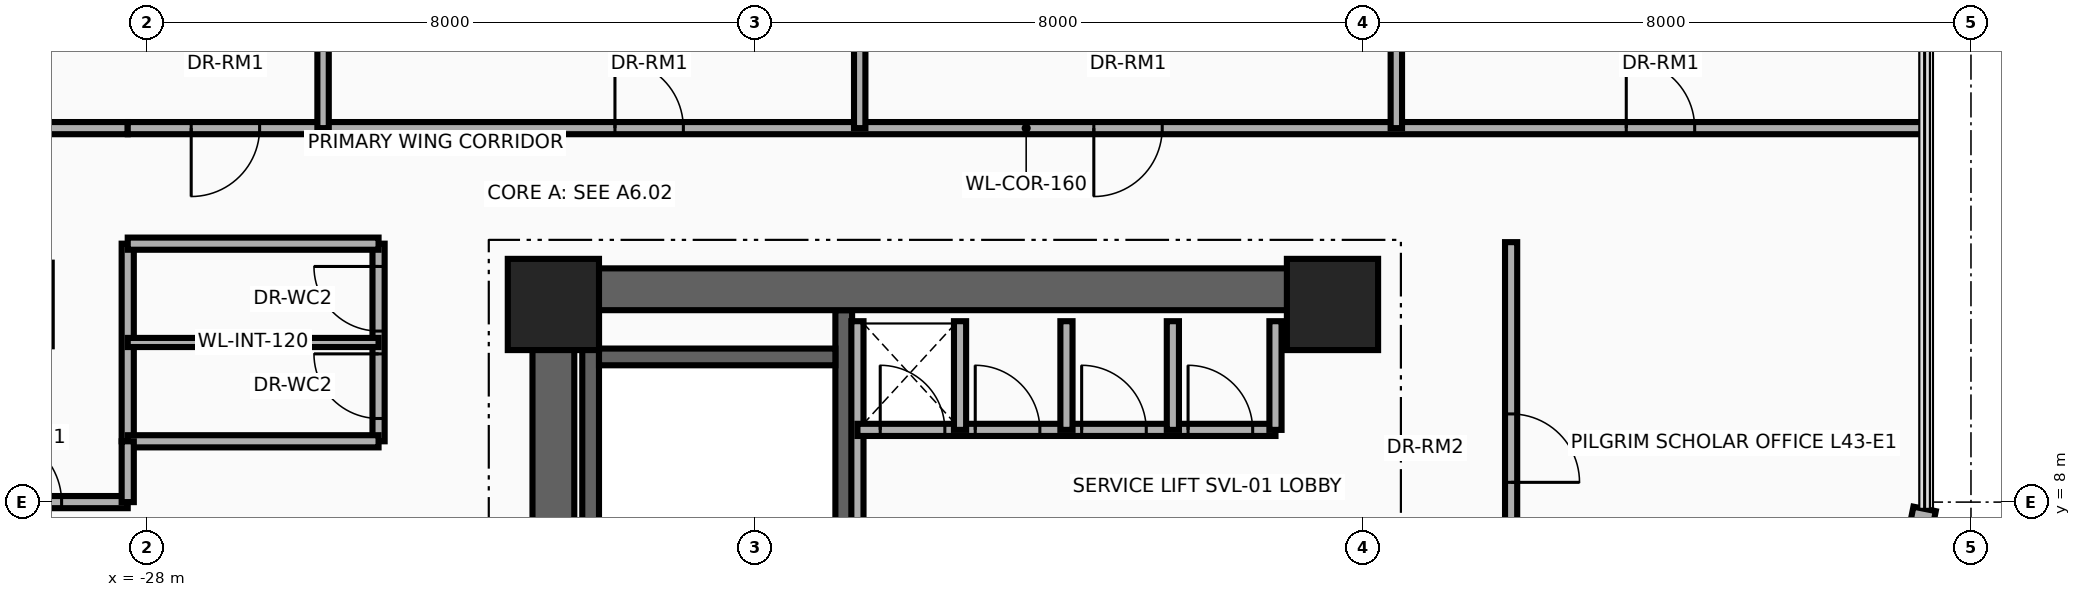
"""IFC4 building model, lengths in metres.
Left out: names, types, materials, properties, quantities, classifications, styles, units other than length and angle.
Written with IfcOpenShell. Run it as: python <this file> out.ifc"""

import sys

from ifc_helpers import new_model, si_unit, direction, frame, frame_2d, origin, origin_2d, place, context, subcontext, project, spatial, rectangle, extrude, source, transform, mapped, element, fill, save


model = new_model("IFC4")
c1 = context("Model", 3, precision=1e-05, world=origin(), true_north=direction((0.0, 1.0)))
c2 = subcontext(c1, "Body", "Model", "MODEL_VIEW")
j1 = project(units=[si_unit("LENGTHUNIT", "METRE"), si_unit("PLANEANGLEUNIT", "RADIAN")], contexts=[c1])
p1 = place(None, origin())
s1 = spatial("IfcSite", under=j1, at=p1, CompositionType="ELEMENT")
p2 = place(p1, origin())
s2 = spatial("IfcBuilding", under=s1, at=p2, CompositionType="ELEMENT")
p3 = place(p2, frame((0.0, 0.0, 168.6)))
s3 = spatial("IfcBuildingStorey", under=s2, at=p3, CompositionType="ELEMENT", Elevation=168.6)
for number, where, z_axis, x_axis in (
    (1, (-22.16, 1.78, 0.0), (0.0, 0.0, 1.0), (0.0, 1.0, 0.0)),
    (2, (-18.83, 1.78, 0.0), (0.0, 0.0, 1.0), (0.0, 1.0, 0.0)),
):
    element("IfcWall", number, at=place(p3, frame(where, z_axis=z_axis, x_axis=x_axis)), inside=s3, PredefinedType="SHEAR", context=c2, shape_type="SweptSolid", body=[
        extrude(rectangle(XDim=8.745, YDim=0.22, at=frame_2d((4.373, 0.0))), origin(), (0.0, 0.0, 1.0), 3.3),
    ])
p4 = place(p3, frame((-22.05, 9.91, 0.0), z_axis=(0.0, 0.0, 1.0), x_axis=(1.0, 0.0, 0.0)))
e3 = element("IfcWall", 3, at=p4, inside=s3, PredefinedType="SHEAR", context=c2, shape_type="SweptSolid", body=[
    extrude(rectangle(XDim=3.11, YDim=0.22, at=frame_2d((1.555, 0.0))), origin(), (0.0, 0.0, 1.0), 3.3),
])
p5 = place(p3, frame((-22.65, -11.075, 0.0), z_axis=(0.0, 0.0, 1.0), x_axis=(0.0, 1.0, 0.0)))
e4 = element("IfcWall", 4, at=p5, inside=s3, PredefinedType="SHEAR", context=c2, shape_type="SweptSolid", body=[
    extrude(rectangle(XDim=22.15, YDim=0.55, at=frame_2d((11.075, 0.0))), origin(), (0.0, 0.0, 1.0), 3.3),
])
p6 = place(p3, frame((-22.65, 10.8, 0.0), z_axis=(0.0, 0.0, 1.0), x_axis=(1.0, 0.0, 0.0)))
e5 = element("IfcWall", 5, at=p6, inside=s3, PredefinedType="SHEAR", context=c2, shape_type="SweptSolid", body=[
    extrude(rectangle(XDim=10.25, YDim=0.55, at=frame_2d((5.125, 0.0))), origin(), (0.0, 0.0, 1.0), 3.3),
])
m1 = source(origin(), c2, "Body", "SweptSolid", [
    extrude(rectangle(XDim=1.2, YDim=1.2, at=origin_2d()), origin(), (0.0, 0.0, 1.0), 3.7),
])
for number, where, z_axis, x_axis in (
    (6, (-22.65, 10.6, 0.0), (0.0, 0.0, 1.0), (1.0, 0.0, 0.0)),
    (7, (-12.4, 10.6, 0.0), (0.0, 0.0, 1.0), (1.0, 0.0, 0.0)),
):
    element("IfcColumn", number, at=place(p3, frame(where, z_axis=z_axis, x_axis=x_axis)), inside=s3, PredefinedType="COLUMN", context=c2, shape_type="MappedRepresentation", body=[
        mapped(m1, transform((0.0, 0.0, 0.0), x_axis=(1.0, 0.0, 0.0), y_axis=(0.0, 1.0, 0.0), z_axis=(0.0, 0.0, 1.0), scale=1.0)),
    ])
p7 = place(p3, frame((-4.61, 7.911, 0.0), z_axis=(0.0, 0.0, 1.0), x_axis=(-0.194989739953, -0.980805282058, 0.0)))
e8 = element("IfcWall", 8, at=p7, inside=s3, PredefinedType="SOLIDWALL", context=c2, shape_type="SweptSolid", body=[
    extrude(rectangle(XDim=0.709, YDim=0.3, at=frame_2d((0.354, 0.0))), origin(), (0.0, 0.0, 1.0), 3.3),
])
p8 = place(p3, frame((-18.65, 7.45, 0.0), z_axis=(0.0, 0.0, 1.0), x_axis=(0.0, 1.0, 0.0)))
e9 = element("IfcWall", 9, at=p8, inside=s3, PredefinedType="PARTITIONING", context=c2, shape_type="SweptSolid", body=[
    extrude(rectangle(XDim=2.93, YDim=0.16, at=frame_2d((1.465, 0.0))), origin(), (0.0, 0.0, 1.0), 2.085),
])
p9 = place(p3, frame((-18.65, 8.95, 0.0), z_axis=(0.0, 0.0, 1.0), x_axis=(1.0, 0.0, 0.0)))
e10 = element("IfcWall", 10, at=p9, inside=s3, PredefinedType="PARTITIONING", context=c2, shape_type="SweptSolid", body=[
    extrude(rectangle(XDim=5.5, YDim=0.16, at=frame_2d((2.75, 0.0))), origin(), (0.0, 0.0, 1.0), 3.3),
])
p10 = place(p9, frame((0.3, 0.0, 0.0)))
e11 = element("IfcOpeningElement", 11, at=p10, cuts=e10, PredefinedType="OPENING", context=c2, shape_type="SweptSolid", body=[
    extrude(rectangle(XDim=0.85, YDim=2.05, at=frame_2d((0.425, 1.025))), frame((0.0, 0.095, 0.0), z_axis=(0.0, -1.0, 0.0), x_axis=(1.0, 0.0, 0.0)), (0.0, 0.0, 1.0), 0.19),
])
p11 = place(p9, frame((1.55, 0.0, 0.0)))
e12 = element("IfcOpeningElement", 12, at=p11, cuts=e10, PredefinedType="OPENING", context=c2, shape_type="SweptSolid", body=[
    extrude(rectangle(XDim=0.85, YDim=2.05, at=frame_2d((0.425, 1.025))), frame((0.0, 0.095, 0.0), z_axis=(0.0, -1.0, 0.0), x_axis=(1.0, 0.0, 0.0)), (0.0, 0.0, 1.0), 0.19),
])
p12 = place(p9, frame((2.95, 0.0, 0.0)))
e13 = element("IfcOpeningElement", 13, at=p12, cuts=e10, PredefinedType="OPENING", context=c2, shape_type="SweptSolid", body=[
    extrude(rectangle(XDim=0.85, YDim=2.05, at=frame_2d((0.425, 1.025))), frame((0.0, 0.095, 0.0), z_axis=(0.0, -1.0, 0.0), x_axis=(1.0, 0.0, 0.0)), (0.0, 0.0, 1.0), 0.19),
])
p13 = place(p9, frame((4.35, 0.0, 0.0)))
e14 = element("IfcOpeningElement", 14, at=p13, cuts=e10, PredefinedType="OPENING", context=c2, shape_type="SweptSolid", body=[
    extrude(rectangle(XDim=0.85, YDim=2.05, at=frame_2d((0.425, 1.025))), frame((0.0, 0.095, 0.0), z_axis=(0.0, -1.0, 0.0), x_axis=(1.0, 0.0, 0.0)), (0.0, 0.0, 1.0), 0.19),
])
for number, where, z_axis, x_axis in (
    (15, (-13.15, 8.95, 0.0), (0.0, 0.0, 1.0), (0.0, 1.0, 0.0)),
    (16, (-17.3, 8.95, 0.0), (0.0, 0.0, 1.0), (0.0, 1.0, 0.0)),
    (17, (-15.9, 8.95, 0.0), (0.0, 0.0, 1.0), (0.0, 1.0, 0.0)),
    (18, (-14.5, 8.95, 0.0), (0.0, 0.0, 1.0), (0.0, 1.0, 0.0)),
):
    element("IfcWall", number, at=place(p3, frame(where, z_axis=z_axis, x_axis=x_axis)), inside=s3, PredefinedType="PARTITIONING", context=c2, shape_type="SweptSolid", body=[
        extrude(rectangle(XDim=1.43, YDim=0.16, at=frame_2d((0.715, 0.0))), origin(), (0.0, 0.0, 1.0), 2.085),
    ])
p14 = place(p3, frame((-28.25, 8.8, 0.0), z_axis=(0.0, 0.0, 1.0), x_axis=(0.0, 1.0, 0.0)))
e19 = element("IfcWall", 19, at=p14, inside=s3, PredefinedType="PARTITIONING", context=c2, shape_type="SweptSolid", body=[
    extrude(rectangle(XDim=2.6, YDim=0.16, at=frame_2d((1.3, 0.0))), origin(), (0.0, 0.0, 1.0), 2.085),
])
p15 = place(p3, frame((-24.95, 8.8, 0.0), z_axis=(0.0, 0.0, 1.0), x_axis=(0.0, 1.0, 0.0)))
e20 = element("IfcWall", 20, at=p15, inside=s3, PredefinedType="PARTITIONING", context=c2, shape_type="SweptSolid", body=[
    extrude(rectangle(XDim=2.6, YDim=0.16, at=frame_2d((1.3, 0.0))), origin(), (0.0, 0.0, 1.0), 2.085),
])
p16 = place(p15, frame((0.3, 0.0, 0.0)))
e21 = element("IfcOpeningElement", 21, at=p16, cuts=e20, PredefinedType="OPENING", context=c2, shape_type="SweptSolid", body=[
    extrude(rectangle(XDim=0.85, YDim=2.04, at=frame_2d((0.425, 1.02))), frame((0.0, 0.095, 0.0), z_axis=(0.0, -1.0, 0.0), x_axis=(1.0, 0.0, 0.0)), (0.0, 0.0, 1.0), 0.19),
])
p17 = place(p15, frame((1.45, 0.0, 0.0)))
e22 = element("IfcOpeningElement", 22, at=p17, cuts=e20, PredefinedType="OPENING", context=c2, shape_type="SweptSolid", body=[
    extrude(rectangle(XDim=0.85, YDim=2.04, at=frame_2d((0.425, 1.02))), frame((0.0, 0.095, 0.0), z_axis=(0.0, -1.0, 0.0), x_axis=(1.0, 0.0, 0.0)), (0.0, 0.0, 1.0), 0.19),
])
for number, where, z_axis, x_axis in (
    (23, (-28.25, 8.8, 0.0), (0.0, 0.0, 1.0), (1.0, 0.0, 0.0)),
    (24, (-28.25, 11.4, 0.0), (0.0, 0.0, 1.0), (1.0, 0.0, 0.0)),
):
    element("IfcWall", number, at=place(p3, frame(where, z_axis=z_axis, x_axis=x_axis)), inside=s3, PredefinedType="PARTITIONING", context=c2, shape_type="SweptSolid", body=[
        extrude(rectangle(XDim=3.3, YDim=0.16, at=frame_2d((1.65, 0.0))), origin(), (0.0, 0.0, 1.0), 3.3),
    ])
p18 = place(p3, frame((-28.25, 10.1, 0.0), z_axis=(0.0, 0.0, 1.0), x_axis=(1.0, 0.0, 0.0)))
e25 = element("IfcWall", 25, at=p18, inside=s3, PredefinedType="PARTITIONING", context=c2, shape_type="SweptSolid", body=[
    extrude(rectangle(XDim=3.3, YDim=0.12, at=frame_2d((1.65, 0.0))), origin(), (0.0, 0.0, 1.0), 2.085),
])
p19 = place(p3, frame((-30.89, 8.0, 0.0), z_axis=(0.0, 0.0, 1.0), x_axis=(1.0, 0.0, 0.0)))
e26 = element("IfcWall", 26, at=p19, inside=s3, PredefinedType="PARTITIONING", context=c2, shape_type="SweptSolid", body=[
    extrude(rectangle(XDim=2.64, YDim=0.16, at=frame_2d((1.32, 0.0))), origin(), (0.0, 0.0, 1.0), 2.746),
])
p20 = place(p19, frame((0.87, 0.0, 0.0)))
e27 = element("IfcOpeningElement", 27, at=p20, cuts=e26, PredefinedType="OPENING", context=c2, shape_type="SweptSolid", body=[
    extrude(rectangle(XDim=0.9, YDim=2.1, at=frame_2d((0.45, 1.05))), frame((0.0, 0.095, 0.0), z_axis=(0.0, -1.0, 0.0), x_axis=(1.0, 0.0, 0.0)), (0.0, 0.0, 1.0), 0.19),
])
p21 = place(p3, frame((-28.25, 8.0, 0.0), z_axis=(0.0, 0.0, 1.0), x_axis=(0.0, 1.0, 0.0)))
e28 = element("IfcWall", 28, at=p21, inside=s3, PredefinedType="PARTITIONING", context=c2, shape_type="SweptSolid", body=[
    extrude(rectangle(XDim=0.8, YDim=0.16, at=frame_2d((0.4, 0.0))), origin(), (0.0, 0.0, 1.0), 2.828),
])
p22 = place(p3, frame((-30.89, 12.92, 0.0), z_axis=(0.0, 0.0, 1.0), x_axis=(1.0, 0.0, 0.0)))
e29 = element("IfcWall", 29, at=p22, inside=s3, PredefinedType="PARTITIONING", context=c2, shape_type="SweptSolid", body=[
    extrude(rectangle(XDim=2.64, YDim=0.16, at=frame_2d((1.32, 0.0))), origin(), (0.0, 0.0, 1.0), 2.746),
])
p23 = place(p3, frame((-28.25, 12.92, 0.0), z_axis=(0.0, 0.0, 1.0), x_axis=(1.0, 0.0, 0.0)))
e30 = element("IfcWall", 30, at=p23, inside=s3, PredefinedType="PARTITIONING", context=c2, shape_type="SweptSolid", body=[
    extrude(rectangle(XDim=23.64, YDim=0.16, at=frame_2d((11.82, 0.0))), origin(), (0.0, 0.0, 1.0), 2.674),
])
p24 = place(p23, frame((0.835, 0.0, 0.0)))
e31 = element("IfcOpeningElement", 31, at=p24, cuts=e30, PredefinedType="OPENING", context=c2, shape_type="SweptSolid", body=[
    extrude(rectangle(XDim=0.9, YDim=2.1, at=frame_2d((0.45, 1.05))), frame((0.0, 0.095, 0.0), z_axis=(0.0, -1.0, 0.0), x_axis=(1.0, 0.0, 0.0)), (0.0, 0.0, 1.0), 0.19),
])
p25 = place(p23, frame((6.41, 0.0, 0.0)))
e32 = element("IfcOpeningElement", 32, at=p25, cuts=e30, PredefinedType="OPENING", context=c2, shape_type="SweptSolid", body=[
    extrude(rectangle(XDim=0.9, YDim=2.1, at=frame_2d((0.45, 1.05))), frame((0.0, 0.095, 0.0), z_axis=(0.0, -1.0, 0.0), x_axis=(1.0, 0.0, 0.0)), (0.0, 0.0, 1.0), 0.19),
])
p26 = place(p23, frame((12.71, 0.0, 0.0)))
e33 = element("IfcOpeningElement", 33, at=p26, cuts=e30, PredefinedType="OPENING", context=c2, shape_type="SweptSolid", body=[
    extrude(rectangle(XDim=0.9, YDim=2.1, at=frame_2d((0.45, 1.05))), frame((0.0, 0.095, 0.0), z_axis=(0.0, -1.0, 0.0), x_axis=(1.0, 0.0, 0.0)), (0.0, 0.0, 1.0), 0.19),
])
p27 = place(p23, frame((19.715, 0.0, 0.0)))
e34 = element("IfcOpeningElement", 34, at=p27, cuts=e30, PredefinedType="OPENING", context=c2, shape_type="SweptSolid", body=[
    extrude(rectangle(XDim=0.9, YDim=2.1, at=frame_2d((0.45, 1.05))), frame((0.0, 0.095, 0.0), z_axis=(0.0, -1.0, 0.0), x_axis=(1.0, 0.0, 0.0)), (0.0, 0.0, 1.0), 0.19),
])
p28 = place(p3, frame((-25.68, 12.92, 0.0), z_axis=(0.0, 0.0, 1.0), x_axis=(0.0, 1.0, 0.0)))
e35 = element("IfcWall", 35, at=p28, inside=s3, PredefinedType="PARTITIONING", context=c2, shape_type="SweptSolid", body=[
    extrude(rectangle(XDim=6.051, YDim=0.15, at=frame_2d((3.025, 0.0))), origin(), (0.0, 0.0, 1.0), 2.085),
])
p29 = place(p3, frame((-18.62, 12.92, 0.0), z_axis=(0.0, 0.0, 1.0), x_axis=(0.0, 1.0, 0.0)))
e36 = element("IfcWall", 36, at=p29, inside=s3, PredefinedType="PARTITIONING", context=c2, shape_type="SweptSolid", body=[
    extrude(rectangle(XDim=6.424, YDim=0.15, at=frame_2d((3.212, 0.0))), origin(), (0.0, 0.0, 1.0), 2.085),
])
p30 = place(p3, frame((-11.56, 12.92, 0.0), z_axis=(0.0, 0.0, 1.0), x_axis=(0.0, 1.0, 0.0)))
e37 = element("IfcWall", 37, at=p30, inside=s3, PredefinedType="PARTITIONING", context=c2, shape_type="SweptSolid", body=[
    extrude(rectangle(XDim=6.797, YDim=0.15, at=frame_2d((3.398, 0.0))), origin(), (0.0, 0.0, 1.0), 1.785),
])
p31 = place(p3, frame((-10.05, 6.0, 0.0), z_axis=(0.0, 0.0, 1.0), x_axis=(0.0, 1.0, 0.0)))
e38 = element("IfcWall", 38, at=p31, inside=s3, PredefinedType="PARTITIONING", context=c2, shape_type="SweptSolid", body=[
    extrude(rectangle(XDim=5.42, YDim=0.16, at=frame_2d((2.71, 0.0))), origin(), (0.0, 0.0, 1.0), 1.785),
])
p32 = place(p31, frame((2.26, 0.0, 0.0)))
e39 = element("IfcOpeningElement", 39, at=p32, cuts=e38, PredefinedType="OPENING", context=c2, shape_type="SweptSolid", body=[
    extrude(rectangle(XDim=0.9, YDim=2.04, at=frame_2d((0.45, 1.02))), frame((0.0, 0.095, 0.0), z_axis=(0.0, -1.0, 0.0), x_axis=(1.0, 0.0, 0.0)), (0.0, 0.0, 1.0), 0.19),
])
p33 = place(p10, origin())
e40 = element("IfcDoor", 40, at=p33, inside=s3, OperationType="SINGLE_SWING_LEFT", PredefinedType="DOOR", context=c2, shape_type="SweptSolid", body=[
    extrude(rectangle(XDim=0.85, YDim=2.05, at=frame_2d((0.425, 1.025))), frame((0.0, 0.025, 0.0), z_axis=(0.0, -1.0, 0.0), x_axis=(1.0, 0.0, 0.0)), (0.0, 0.0, 1.0), 0.05),
])
fill(e11, e40)
p34 = place(p11, origin())
e41 = element("IfcDoor", 41, at=p34, inside=s3, OperationType="SINGLE_SWING_RIGHT", PredefinedType="DOOR", context=c2, shape_type="SweptSolid", body=[
    extrude(rectangle(XDim=0.85, YDim=2.05, at=frame_2d((0.425, 1.025))), frame((0.0, 0.025, 0.0), z_axis=(0.0, -1.0, 0.0), x_axis=(1.0, 0.0, 0.0)), (0.0, 0.0, 1.0), 0.05),
])
fill(e12, e41)
p35 = place(p12, origin())
e42 = element("IfcDoor", 42, at=p35, inside=s3, OperationType="SINGLE_SWING_LEFT", PredefinedType="DOOR", context=c2, shape_type="SweptSolid", body=[
    extrude(rectangle(XDim=0.85, YDim=2.05, at=frame_2d((0.425, 1.025))), frame((0.0, 0.025, 0.0), z_axis=(0.0, -1.0, 0.0), x_axis=(1.0, 0.0, 0.0)), (0.0, 0.0, 1.0), 0.05),
])
fill(e13, e42)
p36 = place(p13, origin())
e43 = element("IfcDoor", 43, at=p36, inside=s3, OperationType="SINGLE_SWING_RIGHT", PredefinedType="DOOR", context=c2, shape_type="SweptSolid", body=[
    extrude(rectangle(XDim=0.85, YDim=2.05, at=frame_2d((0.425, 1.025))), frame((0.0, 0.025, 0.0), z_axis=(0.0, -1.0, 0.0), x_axis=(1.0, 0.0, 0.0)), (0.0, 0.0, 1.0), 0.05),
])
fill(e14, e43)
p37 = place(p16, origin())
e44 = element("IfcDoor", 44, at=p37, inside=s3, OperationType="SINGLE_SWING_RIGHT", PredefinedType="DOOR", context=c2, shape_type="SweptSolid", body=[
    extrude(rectangle(XDim=0.85, YDim=2.04, at=frame_2d((0.425, 1.02))), frame((0.0, 0.025, 0.0), z_axis=(0.0, -1.0, 0.0), x_axis=(1.0, 0.0, 0.0)), (0.0, 0.0, 1.0), 0.05),
])
fill(e21, e44)
p38 = place(p17, origin())
e45 = element("IfcDoor", 45, at=p38, inside=s3, OperationType="SINGLE_SWING_LEFT", PredefinedType="DOOR", context=c2, shape_type="SweptSolid", body=[
    extrude(rectangle(XDim=0.85, YDim=2.04, at=frame_2d((0.425, 1.02))), frame((0.0, 0.025, 0.0), z_axis=(0.0, -1.0, 0.0), x_axis=(1.0, 0.0, 0.0)), (0.0, 0.0, 1.0), 0.05),
])
fill(e22, e45)
p39 = place(p20, origin())
e46 = element("IfcDoor", 46, at=p39, inside=s3, OperationType="SINGLE_SWING_RIGHT", PredefinedType="DOOR", context=c2, shape_type="SweptSolid", body=[
    extrude(rectangle(XDim=0.9, YDim=2.1, at=frame_2d((0.45, 1.05))), frame((0.0, 0.025, 0.0), z_axis=(0.0, -1.0, 0.0), x_axis=(1.0, 0.0, 0.0)), (0.0, 0.0, 1.0), 0.05),
])
fill(e27, e46)
p40 = place(p24, frame((0.9, 0.0, 0.0), z_axis=(0.0, 0.0, 1.0), x_axis=(-1.0, 0.0, 0.0)))
e47 = element("IfcDoor", 47, at=p40, inside=s3, OperationType="SINGLE_SWING_LEFT", PredefinedType="DOOR", context=c2, shape_type="SweptSolid", body=[
    extrude(rectangle(XDim=0.9, YDim=2.1, at=frame_2d((0.45, 1.05))), frame((0.0, 0.025, 0.0), z_axis=(0.0, -1.0, 0.0), x_axis=(1.0, 0.0, 0.0)), (0.0, 0.0, 1.0), 0.05),
])
fill(e31, e47)
p41 = place(p25, origin())
e48 = element("IfcDoor", 48, at=p41, inside=s3, OperationType="SINGLE_SWING_RIGHT", PredefinedType="DOOR", context=c2, shape_type="SweptSolid", body=[
    extrude(rectangle(XDim=0.9, YDim=2.1, at=frame_2d((0.45, 1.05))), frame((0.0, 0.025, 0.0), z_axis=(0.0, -1.0, 0.0), x_axis=(1.0, 0.0, 0.0)), (0.0, 0.0, 1.0), 0.05),
])
fill(e32, e48)
p42 = place(p26, frame((0.9, 0.0, 0.0), z_axis=(0.0, 0.0, 1.0), x_axis=(-1.0, 0.0, 0.0)))
e49 = element("IfcDoor", 49, at=p42, inside=s3, OperationType="SINGLE_SWING_LEFT", PredefinedType="DOOR", context=c2, shape_type="SweptSolid", body=[
    extrude(rectangle(XDim=0.9, YDim=2.1, at=frame_2d((0.45, 1.05))), frame((0.0, 0.025, 0.0), z_axis=(0.0, -1.0, 0.0), x_axis=(1.0, 0.0, 0.0)), (0.0, 0.0, 1.0), 0.05),
])
fill(e33, e49)
p43 = place(p27, origin())
e50 = element("IfcDoor", 50, at=p43, inside=s3, OperationType="SINGLE_SWING_RIGHT", PredefinedType="DOOR", context=c2, shape_type="SweptSolid", body=[
    extrude(rectangle(XDim=0.9, YDim=2.1, at=frame_2d((0.45, 1.05))), frame((0.0, 0.025, 0.0), z_axis=(0.0, -1.0, 0.0), x_axis=(1.0, 0.0, 0.0)), (0.0, 0.0, 1.0), 0.05),
])
fill(e34, e50)
p44 = place(p32, frame((0.9, 0.0, 0.0), z_axis=(0.0, 0.0, 1.0), x_axis=(-1.0, 0.0, 0.0)))
e51 = element("IfcDoor", 51, at=p44, inside=s3, OperationType="SINGLE_SWING_LEFT", PredefinedType="DOOR", context=c2, shape_type="SweptSolid", body=[
    extrude(rectangle(XDim=0.9, YDim=2.04, at=frame_2d((0.45, 1.02))), frame((0.0, 0.025, 0.0), z_axis=(0.0, -1.0, 0.0), x_axis=(1.0, 0.0, 0.0)), (0.0, 0.0, 1.0), 0.05),
])
fill(e39, e51)
save(model, sys.argv[1])
